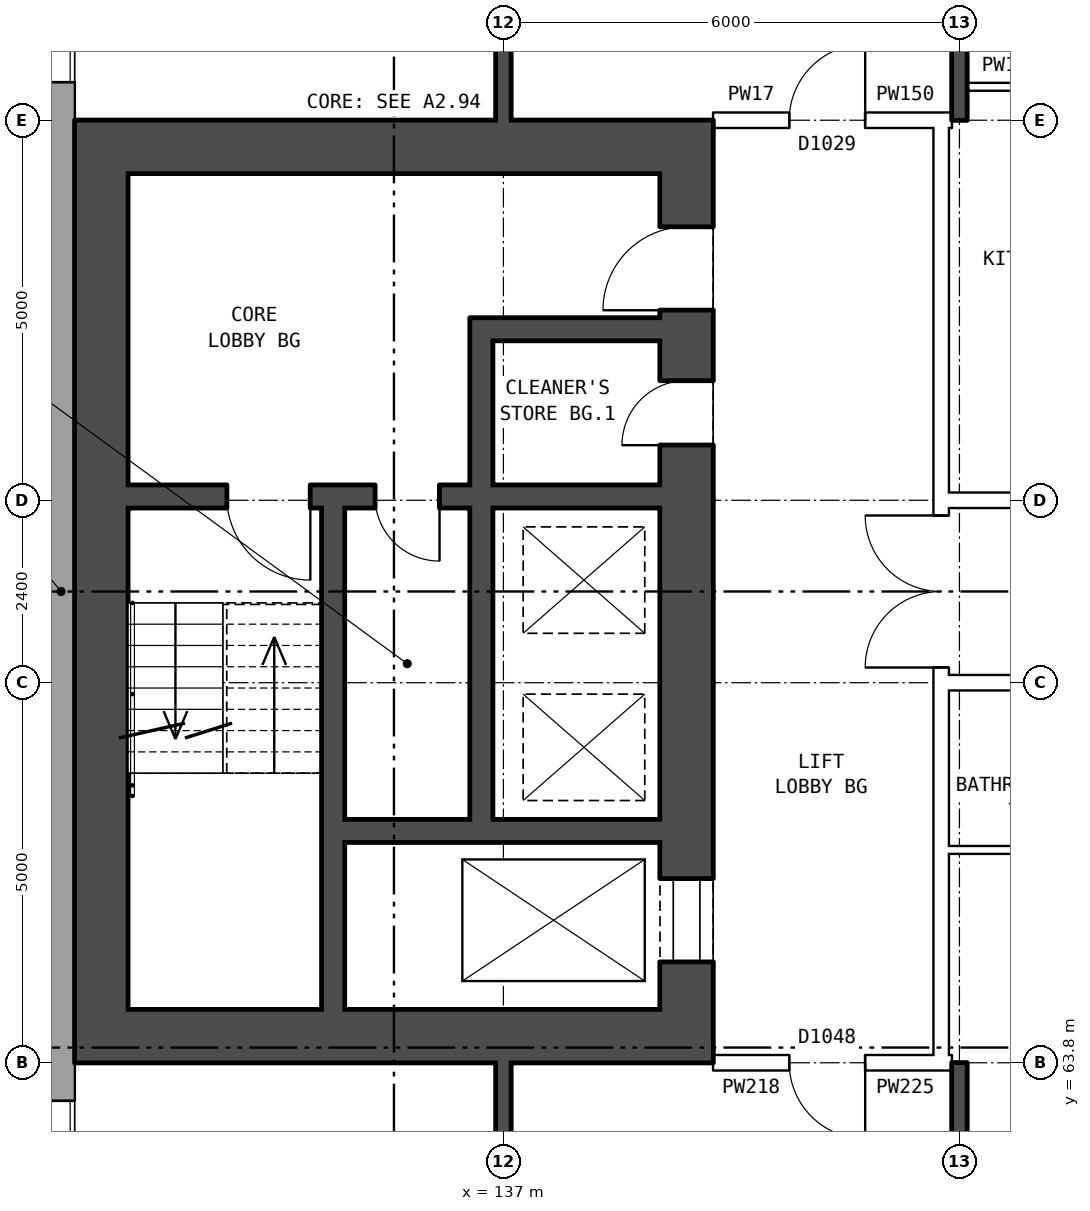
"""IFC4 building model, lengths in metres.
Left out: names, types, materials, properties, quantities, classifications, styles, units other than length and angle.
Written with IfcOpenShell. Run it as: python <this file> out.ifc"""

import sys

from ifc_helpers import new_model, si_unit, direction, frame, frame_2d, origin, place, context, subcontext, project, spatial, rectangle, extrude, element, fill, save


model = new_model("IFC4")
c1 = context("Model", 3, precision=1e-05, world=origin(), true_north=direction((0.0, 1.0)))
c2 = subcontext(c1, "Body", "Model", "MODEL_VIEW")
j1 = project(units=[si_unit("LENGTHUNIT", "METRE"), si_unit("PLANEANGLEUNIT", "RADIAN")], contexts=[c1])
p1 = place(None, origin())
s1 = spatial("IfcSite", under=j1, at=p1, CompositionType="ELEMENT")
p2 = place(p1, origin())
s2 = spatial("IfcBuilding", under=s1, at=p2, CompositionType="ELEMENT")
p3 = place(p2, frame((0.0, 0.0, 87.1)))
s3 = spatial("IfcBuildingStorey", under=s2, at=p3, CompositionType="ELEMENT", Elevation=87.1)
p4 = place(p3, frame((131.18, 82.925, 0.0), z_axis=(0.0, 0.0, 1.0), x_axis=(0.0, -1.0, 0.0)))
e1 = element("IfcWall", 1, at=p4, inside=s3, PredefinedType="STANDARD", context=c2, shape_type="SweptSolid", body=[
    extrude(rectangle(XDim=25.851, YDim=0.36, at=frame_2d((12.925, 0.0))), origin(), (0.0, 0.0, 1.0), 2.85),
])
p5 = place(p4, frame((1.625, 0.0, 0.8)))
e2 = element("IfcOpeningElement", 2, at=p5, cuts=e1, PredefinedType="OPENING", context=c2, shape_type="SweptSolid", body=[
    extrude(rectangle(XDim=1.6, YDim=1.8, at=frame_2d((0.8, 0.9))), frame((0.0, 0.19, 0.0), z_axis=(0.0, -1.0, 0.0), x_axis=(1.0, 0.0, 0.0)), (0.0, 0.0, 1.0), 0.38),
])
p6 = place(p4, frame((4.625, 0.0, 0.8)))
e3 = element("IfcOpeningElement", 3, at=p6, cuts=e1, PredefinedType="OPENING", context=c2, shape_type="SweptSolid", body=[
    extrude(rectangle(XDim=1.6, YDim=1.8, at=frame_2d((0.8, 0.9))), frame((0.0, 0.19, 0.0), z_axis=(0.0, -1.0, 0.0), x_axis=(1.0, 0.0, 0.0)), (0.0, 0.0, 1.0), 0.38),
])
p7 = place(p4, frame((19.625, 0.0, 0.8)))
e4 = element("IfcOpeningElement", 4, at=p7, cuts=e1, PredefinedType="OPENING", context=c2, shape_type="SweptSolid", body=[
    extrude(rectangle(XDim=1.6, YDim=1.8, at=frame_2d((0.8, 0.9))), frame((0.0, 0.19, 0.0), z_axis=(0.0, -1.0, 0.0), x_axis=(1.0, 0.0, 0.0)), (0.0, 0.0, 1.0), 0.38),
])
p8 = place(p4, frame((22.625, 0.0, 0.8)))
e5 = element("IfcOpeningElement", 5, at=p8, cuts=e1, PredefinedType="OPENING", context=c2, shape_type="SweptSolid", body=[
    extrude(rectangle(XDim=1.6, YDim=1.8, at=frame_2d((0.8, 0.9))), frame((0.0, 0.19, 0.0), z_axis=(0.0, -1.0, 0.0), x_axis=(1.0, 0.0, 0.0)), (0.0, 0.0, 1.0), 0.38),
])
p9 = place(p3, frame((139.41, 64.5, 0.0), z_axis=(0.0, 0.0, 1.0), x_axis=(0.0, 1.0, 0.0)))
e6 = element("IfcWall", 6, at=p9, inside=s3, PredefinedType="SHEAR", context=c2, shape_type="SweptSolid", body=[
    extrude(rectangle(XDim=11.0, YDim=0.7, at=frame_2d((5.5, 0.0))), origin(), (0.0, 0.0, 1.0), 2.85),
])
p10 = place(p9, frame((0.625, 0.0, 0.0)))
e7 = element("IfcOpeningElement", 7, at=p10, cuts=e6, PredefinedType="OPENING", context=c2, shape_type="SweptSolid", body=[
    extrude(rectangle(XDim=1.1, YDim=2.1, at=frame_2d((0.55, 1.05))), frame((0.0, 0.36, 0.0), z_axis=(0.0, -1.0, 0.0), x_axis=(1.0, 0.0, 0.0)), (0.0, 0.0, 1.0), 0.72),
])
p11 = place(p9, frame((9.2, 0.0, 0.0)))
e8 = element("IfcOpeningElement", 8, at=p11, cuts=e6, PredefinedType="OPENING", context=c2, shape_type="SweptSolid", body=[
    extrude(rectangle(XDim=1.1, YDim=2.1, at=frame_2d((0.55, 1.05))), frame((0.0, 0.36, 0.0), z_axis=(0.0, -1.0, 0.0), x_axis=(1.0, 0.0, 0.0)), (0.0, 0.0, 1.0), 0.72),
])
p12 = place(p9, frame((7.425, 0.0, 0.0)))
e9 = element("IfcOpeningElement", 9, at=p12, cuts=e6, PredefinedType="OPENING", context=c2, shape_type="SweptSolid", body=[
    extrude(rectangle(XDim=0.85, YDim=2.1, at=frame_2d((0.425, 1.05))), frame((0.0, 0.36, 0.0), z_axis=(0.0, -1.0, 0.0), x_axis=(1.0, 0.0, 0.0)), (0.0, 0.0, 1.0), 0.72),
])
p13 = place(p3, frame((131.71, 64.5, 0.0), z_axis=(0.0, 0.0, 1.0), x_axis=(0.0, 1.0, 0.0)))
e10 = element("IfcWall", 10, at=p13, inside=s3, PredefinedType="SHEAR", context=c2, shape_type="SweptSolid", body=[
    extrude(rectangle(XDim=11.0, YDim=0.7, at=frame_2d((5.5, 0.0))), origin(), (0.0, 0.0, 1.0), 2.85),
])
for number, where, z_axis, x_axis in (
    (11, (139.76, 64.15, 0.0), (0.0, 0.0, 1.0), (-1.0, 0.0, 0.0)),
    (12, (139.76, 75.85, 0.0), (0.0, 0.0, 1.0), (-1.0, 0.0, 0.0)),
):
    element("IfcWall", number, at=place(p3, frame(where, z_axis=z_axis, x_axis=x_axis)), inside=s3, PredefinedType="SHEAR", context=c2, shape_type="SweptSolid", body=[
        extrude(rectangle(XDim=8.4, YDim=0.7, at=frame_2d((4.2, 0.0))), origin(), (0.0, 0.0, 1.0), 2.85),
    ])
p14 = place(p3, frame((139.06, 66.85, 0.0), z_axis=(0.0, 0.0, 1.0), x_axis=(-1.0, 0.0, 0.0)))
e13 = element("IfcWall", 13, at=p14, inside=s3, PredefinedType="SHEAR", context=c2, shape_type="SweptSolid", body=[
    extrude(rectangle(XDim=4.15, YDim=0.3, at=frame_2d((2.075, 0.0))), origin(), (0.0, 0.0, 1.0), 2.85),
])
p15 = place(p3, frame((139.06, 71.25, 0.0), z_axis=(0.0, 0.0, 1.0), x_axis=(-1.0, 0.0, 0.0)))
e14 = element("IfcWall", 14, at=p15, inside=s3, PredefinedType="SHEAR", context=c2, shape_type="SweptSolid", body=[
    extrude(rectangle(XDim=7.0, YDim=0.3, at=frame_2d((3.5, 0.0))), origin(), (0.0, 0.0, 1.0), 2.85),
])
p16 = place(p15, frame((4.6, 0.0, 0.0)))
e15 = element("IfcOpeningElement", 15, at=p16, cuts=e14, PredefinedType="OPENING", context=c2, shape_type="SweptSolid", body=[
    extrude(rectangle(XDim=1.1, YDim=2.1, at=frame_2d((0.55, 1.05))), frame((0.0, 0.16, 0.0), z_axis=(0.0, -1.0, 0.0), x_axis=(1.0, 0.0, 0.0)), (0.0, 0.0, 1.0), 0.32),
])
p17 = place(p15, frame((2.9, 0.0, 0.0)))
e16 = element("IfcOpeningElement", 16, at=p17, cuts=e14, PredefinedType="OPENING", context=c2, shape_type="SweptSolid", body=[
    extrude(rectangle(XDim=0.85, YDim=2.1, at=frame_2d((0.425, 1.05))), frame((0.0, 0.16, 0.0), z_axis=(0.0, -1.0, 0.0), x_axis=(1.0, 0.0, 0.0)), (0.0, 0.0, 1.0), 0.32),
])
p18 = place(p3, frame((139.06, 73.45, 0.0), z_axis=(0.0, 0.0, 1.0), x_axis=(-1.0, 0.0, 0.0)))
e17 = element("IfcWall", 17, at=p18, inside=s3, PredefinedType="SHEAR", context=c2, shape_type="SweptSolid", body=[
    extrude(rectangle(XDim=2.2, YDim=0.3, at=frame_2d((1.1, 0.0))), origin(), (0.0, 0.0, 1.0), 2.85),
])
p19 = place(p3, frame((136.71, 67.0, 0.0), z_axis=(0.0, 0.0, 1.0), x_axis=(0.0, 1.0, 0.0)))
e18 = element("IfcWall", 18, at=p19, inside=s3, PredefinedType="SHEAR", context=c2, shape_type="SweptSolid", body=[
    extrude(rectangle(XDim=4.1, YDim=0.3, at=frame_2d((2.05, 0.0))), origin(), (0.0, 0.0, 1.0), 2.85),
])
p20 = place(p3, frame((136.71, 71.4, 0.0), z_axis=(0.0, 0.0, 1.0), x_axis=(0.0, 1.0, 0.0)))
e19 = element("IfcWall", 19, at=p20, inside=s3, PredefinedType="SHEAR", context=c2, shape_type="SweptSolid", body=[
    extrude(rectangle(XDim=2.2, YDim=0.3, at=frame_2d((1.1, 0.0))), origin(), (0.0, 0.0, 1.0), 2.85),
])
p21 = place(p3, frame((134.76, 64.5, 0.0), z_axis=(0.0, 0.0, 1.0), x_axis=(0.0, 1.0, 0.0)))
e20 = element("IfcWall", 20, at=p21, inside=s3, PredefinedType="SHEAR", context=c2, shape_type="SweptSolid", body=[
    extrude(rectangle(XDim=6.6, YDim=0.3, at=frame_2d((3.3, 0.0))), origin(), (0.0, 0.0, 1.0), 2.85),
])
p22 = place(p3, frame((142.76, 63.9, 0.0), z_axis=(0.0, 0.0, 1.0), x_axis=(0.0, 1.0, 0.0)))
e21 = element("IfcWall", 21, at=p22, inside=s3, PredefinedType="PARTITIONING", context=c2, shape_type="SweptSolid", body=[
    extrude(rectangle(XDim=12.2, YDim=0.2, at=frame_2d((6.1, 0.0))), origin(), (0.0, 0.0, 1.0), 2.85),
])
p23 = place(p22, frame((5.1, 0.0, 0.0)))
e22 = element("IfcOpeningElement", 22, at=p23, cuts=e21, PredefinedType="OPENING", context=c2, shape_type="SweptSolid", body=[
    extrude(rectangle(XDim=2.0, YDim=2.1, at=frame_2d((1.0, 1.05))), frame((0.0, 0.11, 0.0), z_axis=(0.0, -1.0, 0.0), x_axis=(1.0, 0.0, 0.0)), (0.0, 0.0, 1.0), 0.22),
])
p24 = place(p3, frame((139.76, 63.8, 0.0), z_axis=(0.0, 0.0, 1.0), x_axis=(1.0, 0.0, 0.0)))
e23 = element("IfcWall", 23, at=p24, inside=s3, PredefinedType="PARTITIONING", context=c2, shape_type="SweptSolid", body=[
    extrude(rectangle(XDim=3.0, YDim=0.2, at=frame_2d((1.5, 0.0))), origin(), (0.0, 0.0, 1.0), 2.85),
])
p25 = place(p24, frame((1.0, 0.0, 0.0)))
e24 = element("IfcOpeningElement", 24, at=p25, cuts=e23, PredefinedType="OPENING", context=c2, shape_type="SweptSolid", body=[
    extrude(rectangle(XDim=1.0, YDim=2.1, at=frame_2d((0.5, 1.05))), frame((0.0, 0.11, 0.0), z_axis=(0.0, -1.0, 0.0), x_axis=(1.0, 0.0, 0.0)), (0.0, 0.0, 1.0), 0.22),
])
p26 = place(p3, frame((142.76, 63.8, 0.0), z_axis=(0.0, 0.0, 1.0), x_axis=(1.0, 0.0, 0.0)))
e25 = element("IfcWall", 25, at=p26, inside=s3, PredefinedType="PARTITIONING", context=c2, shape_type="SweptSolid", body=[
    extrude(rectangle(XDim=0.14, YDim=0.2, at=frame_2d((0.07, 0.0))), origin(), (0.0, 0.0, 1.0), 2.85),
])
p27 = place(p3, frame((142.76, 66.6, 0.0), z_axis=(0.0, 0.0, 1.0), x_axis=(1.0, 0.0, 0.0)))
e26 = element("IfcWall", 26, at=p27, inside=s3, PredefinedType="PARTITIONING", context=c2, shape_type="SweptSolid", body=[
    extrude(rectangle(XDim=3.24, YDim=0.1, at=frame_2d((1.62, 0.0))), origin(), (0.0, 0.0, 1.0), 2.85),
])
p28 = place(p3, frame((142.76, 68.8, 0.0), z_axis=(0.0, 0.0, 1.0), x_axis=(1.0, 0.0, 0.0)))
e27 = element("IfcWall", 27, at=p28, inside=s3, PredefinedType="PARTITIONING", context=c2, shape_type="SweptSolid", body=[
    extrude(rectangle(XDim=14.48, YDim=0.2, at=frame_2d((7.24, 0.0))), origin(), (0.0, 0.0, 1.0), 2.85),
])
p29 = place(p28, frame((4.24, 0.0, 0.0)))
e28 = element("IfcOpeningElement", 28, at=p29, cuts=e27, PredefinedType="OPENING", context=c2, shape_type="SweptSolid", body=[
    extrude(rectangle(XDim=1.0, YDim=2.1, at=frame_2d((0.5, 1.05))), frame((0.0, 0.11, 0.0), z_axis=(0.0, -1.0, 0.0), x_axis=(1.0, 0.0, 0.0)), (0.0, 0.0, 1.0), 0.22),
])
p30 = place(p28, frame((10.24, 0.0, 0.0)))
e29 = element("IfcOpeningElement", 29, at=p30, cuts=e27, PredefinedType="OPENING", context=c2, shape_type="SweptSolid", body=[
    extrude(rectangle(XDim=1.0, YDim=2.1, at=frame_2d((0.5, 1.05))), frame((0.0, 0.11, 0.0), z_axis=(0.0, -1.0, 0.0), x_axis=(1.0, 0.0, 0.0)), (0.0, 0.0, 1.0), 0.22),
])
p31 = place(p3, frame((142.76, 71.2, 0.0), z_axis=(0.0, 0.0, 1.0), x_axis=(1.0, 0.0, 0.0)))
e30 = element("IfcWall", 30, at=p31, inside=s3, PredefinedType="PARTITIONING", context=c2, shape_type="SweptSolid", body=[
    extrude(rectangle(XDim=14.48, YDim=0.2, at=frame_2d((7.24, 0.0))), origin(), (0.0, 0.0, 1.0), 2.85),
])
p32 = place(p31, frame((1.12, 0.0, 0.0)))
e31 = element("IfcOpeningElement", 31, at=p32, cuts=e30, PredefinedType="OPENING", context=c2, shape_type="SweptSolid", body=[
    extrude(rectangle(XDim=1.0, YDim=2.1, at=frame_2d((0.5, 1.05))), frame((0.0, 0.11, 0.0), z_axis=(0.0, -1.0, 0.0), x_axis=(1.0, 0.0, 0.0)), (0.0, 0.0, 1.0), 0.22),
])
p33 = place(p31, frame((10.24, 0.0, 0.0)))
e32 = element("IfcOpeningElement", 32, at=p33, cuts=e30, PredefinedType="OPENING", context=c2, shape_type="SweptSolid", body=[
    extrude(rectangle(XDim=1.0, YDim=2.1, at=frame_2d((0.5, 1.05))), frame((0.0, 0.11, 0.0), z_axis=(0.0, -1.0, 0.0), x_axis=(1.0, 0.0, 0.0)), (0.0, 0.0, 1.0), 0.22),
])
p34 = place(p3, frame((139.76, 76.2, 0.0), z_axis=(0.0, 0.0, 1.0), x_axis=(1.0, 0.0, 0.0)))
e33 = element("IfcWall", 33, at=p34, inside=s3, PredefinedType="PARTITIONING", context=c2, shape_type="SweptSolid", body=[
    extrude(rectangle(XDim=3.0, YDim=0.2, at=frame_2d((1.5, 0.0))), origin(), (0.0, 0.0, 1.0), 2.85),
])
p35 = place(p34, frame((1.0, 0.0, 0.0)))
e34 = element("IfcOpeningElement", 34, at=p35, cuts=e33, PredefinedType="OPENING", context=c2, shape_type="SweptSolid", body=[
    extrude(rectangle(XDim=1.0, YDim=2.1, at=frame_2d((0.5, 1.05))), frame((0.0, 0.11, 0.0), z_axis=(0.0, -1.0, 0.0), x_axis=(1.0, 0.0, 0.0)), (0.0, 0.0, 1.0), 0.22),
])
p36 = place(p3, frame((142.76, 76.2, 0.0), z_axis=(0.0, 0.0, 1.0), x_axis=(1.0, 0.0, 0.0)))
e35 = element("IfcWall", 35, at=p36, inside=s3, PredefinedType="PARTITIONING", context=c2, shape_type="SweptSolid", body=[
    extrude(rectangle(XDim=0.14, YDim=0.2, at=frame_2d((0.07, 0.0))), origin(), (0.0, 0.0, 1.0), 2.85),
])
p37 = place(p3, frame((143.1, 76.64, 0.0), z_axis=(0.0, 0.0, 1.0), x_axis=(1.0, 0.0, 0.0)))
e36 = element("IfcWall", 36, at=p37, inside=s3, PredefinedType="PARTITIONING", context=c2, shape_type="SweptSolid", body=[
    extrude(rectangle(XDim=2.9, YDim=0.1, at=frame_2d((1.45, 0.0))), origin(), (0.0, 0.0, 1.0), 2.85),
])
p38 = place(p37, frame((1.0, 0.0, 0.0)))
e37 = element("IfcOpeningElement", 37, at=p38, cuts=e36, PredefinedType="OPENING", context=c2, shape_type="SweptSolid", body=[
    extrude(rectangle(XDim=0.9, YDim=2.1, at=frame_2d((0.45, 1.05))), frame((0.0, 0.06, 0.0), z_axis=(0.0, -1.0, 0.0), x_axis=(1.0, 0.0, 0.0)), (0.0, 0.0, 1.0), 0.12),
])
p39 = place(p3, frame((137.0, 54.36, 0.0), z_axis=(0.0, 0.0, 1.0), x_axis=(0.0, 1.0, 0.0)))
e38 = element("IfcWall", 38, at=p39, inside=s3, PredefinedType="SOLIDWALL", context=c2, shape_type="SweptSolid", body=[
    extrude(rectangle(XDim=9.44, YDim=0.2, at=frame_2d((4.72, 0.0))), origin(), (0.0, 0.0, 1.0), 2.85),
])
p40 = place(p39, frame((1.37, 0.0, 0.0)))
e39 = element("IfcOpeningElement", 39, at=p40, cuts=e38, PredefinedType="OPENING", context=c2, shape_type="SweptSolid", body=[
    extrude(rectangle(XDim=0.9, YDim=2.1, at=frame_2d((0.45, 1.05))), frame((0.0, 0.11, 0.0), z_axis=(0.0, -1.0, 0.0), x_axis=(1.0, 0.0, 0.0)), (0.0, 0.0, 1.0), 0.22),
])
p41 = place(p39, frame((7.34, 0.0, 0.0)))
e40 = element("IfcOpeningElement", 40, at=p41, cuts=e38, PredefinedType="OPENING", context=c2, shape_type="SweptSolid", body=[
    extrude(rectangle(XDim=0.9, YDim=2.1, at=frame_2d((0.45, 1.05))), frame((0.0, 0.11, 0.0), z_axis=(0.0, -1.0, 0.0), x_axis=(1.0, 0.0, 0.0)), (0.0, 0.0, 1.0), 0.22),
])
p42 = place(p3, frame((137.0, 76.2, 0.0), z_axis=(0.0, 0.0, 1.0), x_axis=(0.0, 1.0, 0.0)))
e41 = element("IfcWall", 41, at=p42, inside=s3, PredefinedType="SOLIDWALL", context=c2, shape_type="SweptSolid", body=[
    extrude(rectangle(XDim=9.44, YDim=0.2, at=frame_2d((4.72, 0.0))), origin(), (0.0, 0.0, 1.0), 2.85),
])
p43 = place(p42, frame((1.2, 0.0, 0.0)))
e42 = element("IfcOpeningElement", 42, at=p43, cuts=e41, PredefinedType="OPENING", context=c2, shape_type="SweptSolid", body=[
    extrude(rectangle(XDim=0.9, YDim=2.1, at=frame_2d((0.45, 1.05))), frame((0.0, 0.11, 0.0), z_axis=(0.0, -1.0, 0.0), x_axis=(1.0, 0.0, 0.0)), (0.0, 0.0, 1.0), 0.22),
])
for number, where, z_axis, x_axis in (
    (43, (143.0, 54.36, 0.0), (0.0, 0.0, 1.0), (0.0, 1.0, 0.0)),
    (44, (143.0, 76.2, 0.0), (0.0, 0.0, 1.0), (0.0, 1.0, 0.0)),
):
    element("IfcWall", number, at=place(p3, frame(where, z_axis=z_axis, x_axis=x_axis)), inside=s3, PredefinedType="SOLIDWALL", context=c2, shape_type="SweptSolid", body=[
        extrude(rectangle(XDim=9.44, YDim=0.2, at=frame_2d((4.72, 0.0))), origin(), (0.0, 0.0, 1.0), 2.85),
    ])
p44 = place(p6, origin())
e45 = element("IfcWindow", 45, at=p44, inside=s3, PartitioningType="SINGLE_PANEL", PredefinedType="WINDOW", context=c2, shape_type="SweptSolid", body=[
    extrude(rectangle(XDim=1.6, YDim=1.8, at=frame_2d((0.8, 0.9))), frame((0.0, 0.15, 0.0), z_axis=(0.0, -1.0, 0.0), x_axis=(1.0, 0.0, 0.0)), (0.0, 0.0, 1.0), 0.06),
])
fill(e3, e45)
p45 = place(p7, origin())
e46 = element("IfcWindow", 46, at=p45, inside=s3, PartitioningType="SINGLE_PANEL", PredefinedType="WINDOW", context=c2, shape_type="SweptSolid", body=[
    extrude(rectangle(XDim=1.6, YDim=1.8, at=frame_2d((0.8, 0.9))), frame((0.0, 0.15, 0.0), z_axis=(0.0, -1.0, 0.0), x_axis=(1.0, 0.0, 0.0)), (0.0, 0.0, 1.0), 0.06),
])
fill(e4, e46)
p46 = place(p10, origin())
e47 = element("IfcDoor", 47, at=p46, inside=s3, OperationType="DOUBLE_DOOR_SLIDING", PredefinedType="DOOR", context=c2, shape_type="SweptSolid", body=[
    extrude(rectangle(XDim=1.1, YDim=2.1, at=frame_2d((0.55, 1.05))), frame((0.0, 0.335, 0.0), z_axis=(0.0, -1.0, 0.0), x_axis=(1.0, 0.0, 0.0)), (0.0, 0.0, 1.0), 0.05),
])
fill(e7, e47)
p47 = place(p11, origin())
e48 = element("IfcDoor", 48, at=p47, inside=s3, OperationType="SINGLE_SWING_LEFT", PredefinedType="DOOR", context=c2, shape_type="SweptSolid", body=[
    extrude(rectangle(XDim=1.1, YDim=2.1, at=frame_2d((0.55, 1.05))), frame((0.0, 0.335, 0.0), z_axis=(0.0, -1.0, 0.0), x_axis=(1.0, 0.0, 0.0)), (0.0, 0.0, 1.0), 0.05),
])
fill(e8, e48)
p48 = place(p16, origin())
e49 = element("IfcDoor", 49, at=p48, inside=s3, OperationType="SINGLE_SWING_LEFT", PredefinedType="DOOR", context=c2, shape_type="SweptSolid", body=[
    extrude(rectangle(XDim=1.1, YDim=2.1, at=frame_2d((0.55, 1.05))), frame((0.0, 0.025, 0.0), z_axis=(0.0, -1.0, 0.0), x_axis=(1.0, 0.0, 0.0)), (0.0, 0.0, 1.0), 0.05),
])
fill(e15, e49)
p49 = place(p12, origin())
e50 = element("IfcDoor", 50, at=p49, inside=s3, OperationType="SINGLE_SWING_LEFT", PredefinedType="DOOR", context=c2, shape_type="SweptSolid", body=[
    extrude(rectangle(XDim=0.85, YDim=2.1, at=frame_2d((0.425, 1.05))), frame((0.0, 0.335, 0.0), z_axis=(0.0, -1.0, 0.0), x_axis=(1.0, 0.0, 0.0)), (0.0, 0.0, 1.0), 0.05),
])
fill(e9, e50)
p50 = place(p17, origin())
e51 = element("IfcDoor", 51, at=p50, inside=s3, OperationType="SINGLE_SWING_LEFT", PredefinedType="DOOR", context=c2, shape_type="SweptSolid", body=[
    extrude(rectangle(XDim=0.85, YDim=2.1, at=frame_2d((0.425, 1.05))), frame((0.0, 0.025, 0.0), z_axis=(0.0, -1.0, 0.0), x_axis=(1.0, 0.0, 0.0)), (0.0, 0.0, 1.0), 0.05),
])
fill(e16, e51)
p51 = place(p23, origin())
e52 = element("IfcDoor", 52, at=p51, inside=s3, OperationType="DOUBLE_DOOR_SINGLE_SWING", PredefinedType="DOOR", context=c2, shape_type="SweptSolid", body=[
    extrude(rectangle(XDim=2.0, YDim=2.1, at=frame_2d((1.0, 1.05))), frame((0.0, 0.025, 0.0), z_axis=(0.0, -1.0, 0.0), x_axis=(1.0, 0.0, 0.0)), (0.0, 0.0, 1.0), 0.05),
])
fill(e22, e52)
p52 = place(p25, frame((1.0, 0.0, 0.0), z_axis=(0.0, 0.0, 1.0), x_axis=(-1.0, 0.0, 0.0)))
e53 = element("IfcDoor", 53, at=p52, inside=s3, OperationType="SINGLE_SWING_LEFT", PredefinedType="DOOR", context=c2, shape_type="SweptSolid", body=[
    extrude(rectangle(XDim=1.0, YDim=2.1, at=frame_2d((0.5, 1.05))), frame((0.0, 0.025, 0.0), z_axis=(0.0, -1.0, 0.0), x_axis=(1.0, 0.0, 0.0)), (0.0, 0.0, 1.0), 0.05),
])
fill(e24, e53)
p53 = place(p35, origin())
e54 = element("IfcDoor", 54, at=p53, inside=s3, OperationType="SINGLE_SWING_RIGHT", PredefinedType="DOOR", context=c2, shape_type="SweptSolid", body=[
    extrude(rectangle(XDim=1.0, YDim=2.1, at=frame_2d((0.5, 1.05))), frame((0.0, 0.025, 0.0), z_axis=(0.0, -1.0, 0.0), x_axis=(1.0, 0.0, 0.0)), (0.0, 0.0, 1.0), 0.05),
])
fill(e34, e54)
save(model, sys.argv[1])
